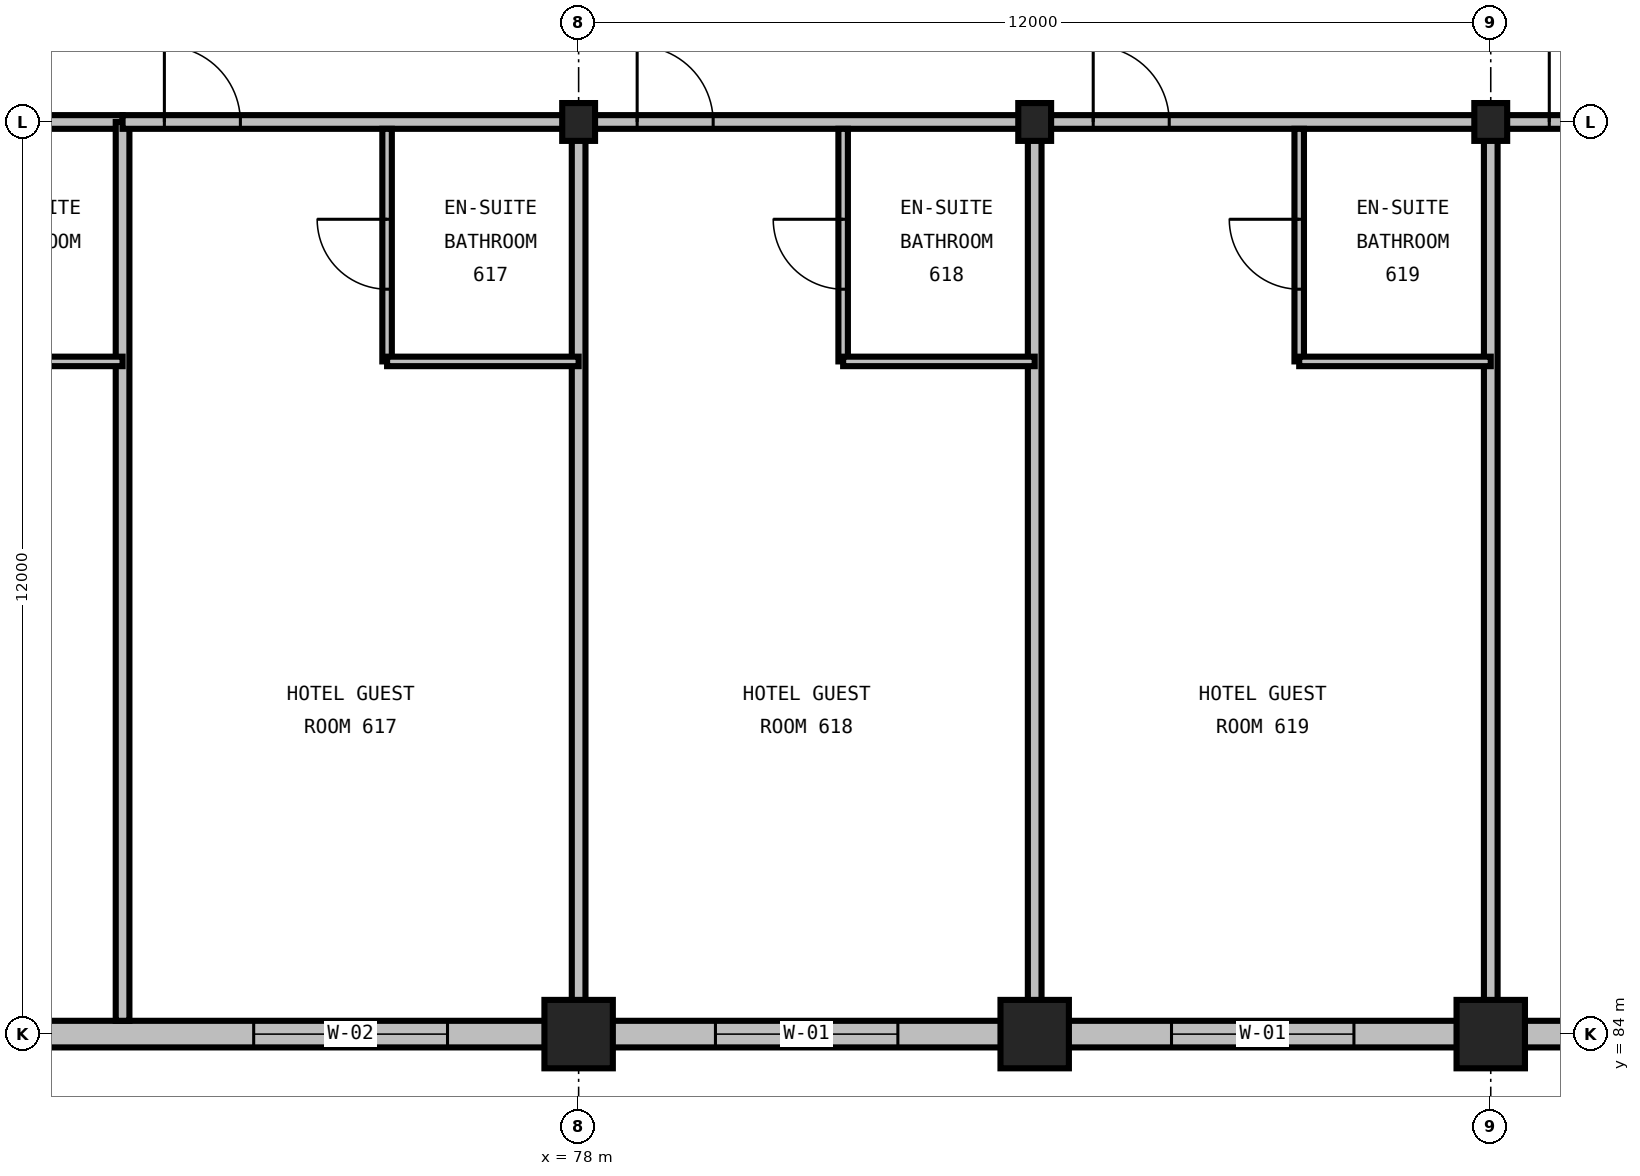
"""IFC4 building model, lengths in metres.
Left out: names, types, materials, properties, quantities, classifications, styles, units other than length and angle.
Written with IfcOpenShell. Run it as: python <this file> out.ifc"""

import sys

from ifc_helpers import new_model, si_unit, direction, frame, frame_2d, origin, origin_2d, place, context, subcontext, project, spatial, rectangle, i_section, extrude, element, fill, save


model = new_model("IFC4")
c1 = context("Model", 3, precision=1e-05, world=origin(), true_north=direction((0.0, 1.0)))
c2 = subcontext(c1, "Body", "Model", "MODEL_VIEW")
j1 = project(units=[si_unit("LENGTHUNIT", "METRE"), si_unit("PLANEANGLEUNIT", "RADIAN")], contexts=[c1])
p1 = place(None, origin())
s1 = spatial("IfcSite", under=j1, at=p1, CompositionType="ELEMENT")
p2 = place(p1, origin())
s2 = spatial("IfcBuilding", under=s1, at=p2, CompositionType="ELEMENT")
p3 = place(p2, frame((0.0, 0.0, 31.2)))
s3 = spatial("IfcBuildingStorey", under=s2, at=p3, CompositionType="ELEMENT", Elevation=31.2)
p4 = place(p3, frame((78.0, 84.0, 0.0), z_axis=(0.0, 0.0, 1.0), x_axis=(1.0, 0.0, 0.0)))
e1 = element("IfcColumn", 1, at=p4, inside=s3, PredefinedType="COLUMN", context=c2, shape_type="SweptSolid", body=[
    extrude(rectangle(XDim=0.9, YDim=0.9, at=origin_2d()), origin(), (0.0, 0.0, 1.0), 3.6),
])
p5 = place(p3, frame((78.0, 96.0, 0.0), z_axis=(0.0, 0.0, 1.0), x_axis=(1.0, 0.0, 0.0)))
e2 = element("IfcColumn", 2, at=p5, inside=s3, PredefinedType="COLUMN", context=c2, shape_type="SweptSolid", body=[
    extrude(i_section(OverallWidth=0.432, OverallDepth=0.498, WebThickness=0.056, FlangeThickness=0.089, FilletRadius=0.031, at=origin_2d()), origin(), (0.0, 0.0, 1.0), 3.6),
])
p6 = place(p3, frame((84.0, 84.0, 0.0), z_axis=(0.0, 0.0, 1.0), x_axis=(1.0, 0.0, 0.0)))
e3 = element("IfcColumn", 3, at=p6, inside=s3, PredefinedType="COLUMN", context=c2, shape_type="SweptSolid", body=[
    extrude(rectangle(XDim=0.9, YDim=0.9, at=origin_2d()), origin(), (0.0, 0.0, 1.0), 3.6),
])
p7 = place(p3, frame((84.0, 96.0, 0.0), z_axis=(0.0, 0.0, 1.0), x_axis=(1.0, 0.0, 0.0)))
e4 = element("IfcColumn", 4, at=p7, inside=s3, PredefinedType="COLUMN", context=c2, shape_type="SweptSolid", body=[
    extrude(i_section(OverallWidth=0.432, OverallDepth=0.498, WebThickness=0.056, FlangeThickness=0.089, FilletRadius=0.031, at=origin_2d()), origin(), (0.0, 0.0, 1.0), 3.6),
])
p8 = place(p3, frame((90.0, 84.0, 0.0), z_axis=(0.0, 0.0, 1.0), x_axis=(1.0, 0.0, 0.0)))
e5 = element("IfcColumn", 5, at=p8, inside=s3, PredefinedType="COLUMN", context=c2, shape_type="SweptSolid", body=[
    extrude(rectangle(XDim=0.9, YDim=0.9, at=origin_2d()), origin(), (0.0, 0.0, 1.0), 3.6),
])
p9 = place(p3, frame((90.0, 96.0, 0.0), z_axis=(0.0, 0.0, 1.0), x_axis=(1.0, 0.0, 0.0)))
e6 = element("IfcColumn", 6, at=p9, inside=s3, PredefinedType="COLUMN", context=c2, shape_type="SweptSolid", body=[
    extrude(i_section(OverallWidth=0.432, OverallDepth=0.498, WebThickness=0.056, FlangeThickness=0.089, FilletRadius=0.031, at=origin_2d()), origin(), (0.0, 0.0, 1.0), 3.6),
])
p10 = place(p3, frame((66.0, 84.0, 0.0), z_axis=(0.0, 0.0, 1.0), x_axis=(1.0, 0.0, 0.0)))
e7 = element("IfcWall", 7, at=p10, inside=s3, PredefinedType="STANDARD", context=c2, shape_type="SweptSolid", body=[
    extrude(rectangle(XDim=12.0, YDim=0.35, at=frame_2d((6.0, 0.0))), origin(), (0.0, 0.0, 1.0), 2.486),
])
p11 = place(p10, frame((1.8, 0.0, 0.75)))
e8 = element("IfcOpeningElement", 8, at=p11, cuts=e7, PredefinedType="OPENING", context=c2, shape_type="SweptSolid", body=[
    extrude(rectangle(XDim=2.4, YDim=1.65, at=frame_2d((1.2, 0.825))), frame((0.0, 0.19, 0.0), z_axis=(0.0, -1.0, 0.0), x_axis=(1.0, 0.0, 0.0)), (0.0, 0.0, 1.0), 0.38),
])
p12 = place(p10, frame((7.725, 0.0, 0.75)))
e9 = element("IfcOpeningElement", 9, at=p12, cuts=e7, PredefinedType="OPENING", context=c2, shape_type="SweptSolid", body=[
    extrude(rectangle(XDim=2.55, YDim=1.65, at=frame_2d((1.275, 0.825))), frame((0.0, 0.19, 0.0), z_axis=(0.0, -1.0, 0.0), x_axis=(1.0, 0.0, 0.0)), (0.0, 0.0, 1.0), 0.38),
])
p13 = place(p3, frame((78.0, 84.0, 0.0), z_axis=(0.0, 0.0, 1.0), x_axis=(1.0, 0.0, 0.0)))
e10 = element("IfcWall", 10, at=p13, inside=s3, PredefinedType="STANDARD", context=c2, shape_type="SweptSolid", body=[
    extrude(rectangle(XDim=6.0, YDim=0.35, at=frame_2d((3.0, 0.0))), origin(), (0.0, 0.0, 1.0), 2.486),
])
p14 = place(p13, frame((1.8, 0.0, 0.75)))
e11 = element("IfcOpeningElement", 11, at=p14, cuts=e10, PredefinedType="OPENING", context=c2, shape_type="SweptSolid", body=[
    extrude(rectangle(XDim=2.4, YDim=1.65, at=frame_2d((1.2, 0.825))), frame((0.0, 0.19, 0.0), z_axis=(0.0, -1.0, 0.0), x_axis=(1.0, 0.0, 0.0)), (0.0, 0.0, 1.0), 0.38),
])
p15 = place(p3, frame((84.0, 84.0, 0.0), z_axis=(0.0, 0.0, 1.0), x_axis=(1.0, 0.0, 0.0)))
e12 = element("IfcWall", 12, at=p15, inside=s3, PredefinedType="STANDARD", context=c2, shape_type="SweptSolid", body=[
    extrude(rectangle(XDim=6.0, YDim=0.35, at=frame_2d((3.0, 0.0))), origin(), (0.0, 0.0, 1.0), 2.486),
])
p16 = place(p15, frame((1.8, 0.0, 0.75)))
e13 = element("IfcOpeningElement", 13, at=p16, cuts=e12, PredefinedType="OPENING", context=c2, shape_type="SweptSolid", body=[
    extrude(rectangle(XDim=2.4, YDim=1.65, at=frame_2d((1.2, 0.825))), frame((0.0, 0.19, 0.0), z_axis=(0.0, -1.0, 0.0), x_axis=(1.0, 0.0, 0.0)), (0.0, 0.0, 1.0), 0.38),
])
p17 = place(p3, frame((90.0, 84.0, 0.0), z_axis=(0.0, 0.0, 1.0), x_axis=(1.0, 0.0, 0.0)))
e14 = element("IfcWall", 14, at=p17, inside=s3, PredefinedType="STANDARD", context=c2, shape_type="SweptSolid", body=[
    extrude(rectangle(XDim=6.0, YDim=0.35, at=frame_2d((3.0, 0.0))), origin(), (0.0, 0.0, 1.0), 2.486),
])
p18 = place(p17, frame((1.8, 0.0, 0.75)))
e15 = element("IfcOpeningElement", 15, at=p18, cuts=e14, PredefinedType="OPENING", context=c2, shape_type="SweptSolid", body=[
    extrude(rectangle(XDim=2.4, YDim=1.65, at=frame_2d((1.2, 0.825))), frame((0.0, 0.19, 0.0), z_axis=(0.0, -1.0, 0.0), x_axis=(1.0, 0.0, 0.0)), (0.0, 0.0, 1.0), 0.38),
])
p19 = place(p3, frame((66.0, 96.0, 0.0), z_axis=(0.0, 0.0, 1.0), x_axis=(1.0, 0.0, 0.0)))
e16 = element("IfcWall", 16, at=p19, inside=s3, PredefinedType="PARTITIONING", context=c2, shape_type="SweptSolid", body=[
    extrude(rectangle(XDim=6.0, YDim=0.18, at=frame_2d((3.0, 0.0))), origin(), (0.0, 0.0, 1.0), 2.664),
])
p20 = place(p19, frame((0.77, 0.0, 0.0)))
e17 = element("IfcOpeningElement", 17, at=p20, cuts=e16, PredefinedType="OPENING", context=c2, shape_type="SweptSolid", body=[
    extrude(rectangle(XDim=1.0, YDim=2.15, at=frame_2d((0.5, 1.075))), frame((0.0, 0.105, 0.0), z_axis=(0.0, -1.0, 0.0), x_axis=(1.0, 0.0, 0.0)), (0.0, 0.0, 1.0), 0.21),
])
p21 = place(p3, frame((72.0, 84.175, 0.0), z_axis=(0.0, 0.0, 1.0), x_axis=(0.0, 1.0, 0.0)))
e18 = element("IfcWall", 18, at=p21, inside=s3, PredefinedType="PARTITIONING", context=c2, shape_type="SweptSolid", body=[
    extrude(rectangle(XDim=11.825, YDim=0.18, at=frame_2d((5.913, 0.0))), origin(), (0.0, 0.0, 1.0), 3.29),
])
p22 = place(p3, frame((69.48, 92.85, 0.0), z_axis=(0.0, 0.0, 1.0), x_axis=(1.0, 0.0, 0.0)))
e19 = element("IfcWall", 19, at=p22, inside=s3, PredefinedType="PARTITIONING", context=c2, shape_type="SweptSolid", body=[
    extrude(rectangle(XDim=2.52, YDim=0.125, at=frame_2d((1.26, 0.0))), origin(), (0.0, 0.0, 1.0), 3.29),
])
p23 = place(p3, frame((72.0, 96.0, 0.0), z_axis=(0.0, 0.0, 1.0), x_axis=(1.0, 0.0, 0.0)))
e20 = element("IfcWall", 20, at=p23, inside=s3, PredefinedType="PARTITIONING", context=c2, shape_type="SweptSolid", body=[
    extrude(rectangle(XDim=6.0, YDim=0.18, at=frame_2d((3.0, 0.0))), origin(), (0.0, 0.0, 1.0), 2.664),
])
p24 = place(p23, frame((0.55, 0.0, 0.0)))
e21 = element("IfcOpeningElement", 21, at=p24, cuts=e20, PredefinedType="OPENING", context=c2, shape_type="SweptSolid", body=[
    extrude(rectangle(XDim=1.0, YDim=2.15, at=frame_2d((0.5, 1.075))), frame((0.0, 0.105, 0.0), z_axis=(0.0, -1.0, 0.0), x_axis=(1.0, 0.0, 0.0)), (0.0, 0.0, 1.0), 0.21),
])
p25 = place(p3, frame((78.0, 84.175, 0.0), z_axis=(0.0, 0.0, 1.0), x_axis=(0.0, 1.0, 0.0)))
e22 = element("IfcWall", 22, at=p25, inside=s3, PredefinedType="PARTITIONING", context=c2, shape_type="SweptSolid", body=[
    extrude(rectangle(XDim=11.825, YDim=0.18, at=frame_2d((5.913, 0.0))), origin(), (0.0, 0.0, 1.0), 2.59),
])
p26 = place(p3, frame((75.48, 92.85, 0.0), z_axis=(0.0, 0.0, 1.0), x_axis=(0.0, 1.0, 0.0)))
e23 = element("IfcWall", 23, at=p26, inside=s3, PredefinedType="PARTITIONING", context=c2, shape_type="SweptSolid", body=[
    extrude(rectangle(XDim=3.06, YDim=0.125, at=frame_2d((1.53, 0.0))), origin(), (0.0, 0.0, 1.0), 3.29),
])
p27 = place(p26, frame((0.95, 0.0, 0.0)))
e24 = element("IfcOpeningElement", 24, at=p27, cuts=e23, PredefinedType="OPENING", context=c2, shape_type="SweptSolid", body=[
    extrude(rectangle(XDim=0.92, YDim=2.1, at=frame_2d((0.46, 1.05))), frame((0.0, 0.077, 0.0), z_axis=(0.0, -1.0, 0.0), x_axis=(1.0, 0.0, 0.0)), (0.0, 0.0, 1.0), 0.155),
])
p28 = place(p3, frame((75.48, 92.85, 0.0), z_axis=(0.0, 0.0, 1.0), x_axis=(1.0, 0.0, 0.0)))
e25 = element("IfcWall", 25, at=p28, inside=s3, PredefinedType="PARTITIONING", context=c2, shape_type="SweptSolid", body=[
    extrude(rectangle(XDim=2.52, YDim=0.125, at=frame_2d((1.26, 0.0))), origin(), (0.0, 0.0, 1.0), 3.29),
])
p29 = place(p3, frame((78.0, 96.0, 0.0), z_axis=(0.0, 0.0, 1.0), x_axis=(1.0, 0.0, 0.0)))
e26 = element("IfcWall", 26, at=p29, inside=s3, PredefinedType="PARTITIONING", context=c2, shape_type="SweptSolid", body=[
    extrude(rectangle(XDim=6.0, YDim=0.18, at=frame_2d((3.0, 0.0))), origin(), (0.0, 0.0, 1.0), 2.736),
])
p30 = place(p29, frame((0.77, 0.0, 0.0)))
e27 = element("IfcOpeningElement", 27, at=p30, cuts=e26, PredefinedType="OPENING", context=c2, shape_type="SweptSolid", body=[
    extrude(rectangle(XDim=1.0, YDim=2.15, at=frame_2d((0.5, 1.075))), frame((0.0, 0.105, 0.0), z_axis=(0.0, -1.0, 0.0), x_axis=(1.0, 0.0, 0.0)), (0.0, 0.0, 1.0), 0.21),
])
p31 = place(p3, frame((84.0, 84.175, 0.0), z_axis=(0.0, 0.0, 1.0), x_axis=(0.0, 1.0, 0.0)))
e28 = element("IfcWall", 28, at=p31, inside=s3, PredefinedType="PARTITIONING", context=c2, shape_type="SweptSolid", body=[
    extrude(rectangle(XDim=11.825, YDim=0.18, at=frame_2d((5.913, 0.0))), origin(), (0.0, 0.0, 1.0), 2.59),
])
p32 = place(p3, frame((81.48, 92.85, 0.0), z_axis=(0.0, 0.0, 1.0), x_axis=(0.0, 1.0, 0.0)))
e29 = element("IfcWall", 29, at=p32, inside=s3, PredefinedType="PARTITIONING", context=c2, shape_type="SweptSolid", body=[
    extrude(rectangle(XDim=3.06, YDim=0.125, at=frame_2d((1.53, 0.0))), origin(), (0.0, 0.0, 1.0), 3.29),
])
p33 = place(p32, frame((0.95, 0.0, 0.0)))
e30 = element("IfcOpeningElement", 30, at=p33, cuts=e29, PredefinedType="OPENING", context=c2, shape_type="SweptSolid", body=[
    extrude(rectangle(XDim=0.92, YDim=2.1, at=frame_2d((0.46, 1.05))), frame((0.0, 0.077, 0.0), z_axis=(0.0, -1.0, 0.0), x_axis=(1.0, 0.0, 0.0)), (0.0, 0.0, 1.0), 0.155),
])
p34 = place(p3, frame((81.48, 92.85, 0.0), z_axis=(0.0, 0.0, 1.0), x_axis=(1.0, 0.0, 0.0)))
e31 = element("IfcWall", 31, at=p34, inside=s3, PredefinedType="PARTITIONING", context=c2, shape_type="SweptSolid", body=[
    extrude(rectangle(XDim=2.52, YDim=0.125, at=frame_2d((1.26, 0.0))), origin(), (0.0, 0.0, 1.0), 3.29),
])
p35 = place(p3, frame((84.0, 96.0, 0.0), z_axis=(0.0, 0.0, 1.0), x_axis=(1.0, 0.0, 0.0)))
e32 = element("IfcWall", 32, at=p35, inside=s3, PredefinedType="PARTITIONING", context=c2, shape_type="SweptSolid", body=[
    extrude(rectangle(XDim=6.0, YDim=0.18, at=frame_2d((3.0, 0.0))), origin(), (0.0, 0.0, 1.0), 2.736),
])
p36 = place(p35, frame((0.77, 0.0, 0.0)))
e33 = element("IfcOpeningElement", 33, at=p36, cuts=e32, PredefinedType="OPENING", context=c2, shape_type="SweptSolid", body=[
    extrude(rectangle(XDim=1.0, YDim=2.15, at=frame_2d((0.5, 1.075))), frame((0.0, 0.105, 0.0), z_axis=(0.0, -1.0, 0.0), x_axis=(1.0, 0.0, 0.0)), (0.0, 0.0, 1.0), 0.21),
])
p37 = place(p3, frame((90.0, 84.175, 0.0), z_axis=(0.0, 0.0, 1.0), x_axis=(0.0, 1.0, 0.0)))
e34 = element("IfcWall", 34, at=p37, inside=s3, PredefinedType="PARTITIONING", context=c2, shape_type="SweptSolid", body=[
    extrude(rectangle(XDim=11.825, YDim=0.18, at=frame_2d((5.913, 0.0))), origin(), (0.0, 0.0, 1.0), 2.59),
])
p38 = place(p3, frame((87.48, 92.85, 0.0), z_axis=(0.0, 0.0, 1.0), x_axis=(0.0, 1.0, 0.0)))
e35 = element("IfcWall", 35, at=p38, inside=s3, PredefinedType="PARTITIONING", context=c2, shape_type="SweptSolid", body=[
    extrude(rectangle(XDim=3.06, YDim=0.125, at=frame_2d((1.53, 0.0))), origin(), (0.0, 0.0, 1.0), 3.29),
])
p39 = place(p38, frame((0.95, 0.0, 0.0)))
e36 = element("IfcOpeningElement", 36, at=p39, cuts=e35, PredefinedType="OPENING", context=c2, shape_type="SweptSolid", body=[
    extrude(rectangle(XDim=0.92, YDim=2.1, at=frame_2d((0.46, 1.05))), frame((0.0, 0.077, 0.0), z_axis=(0.0, -1.0, 0.0), x_axis=(1.0, 0.0, 0.0)), (0.0, 0.0, 1.0), 0.155),
])
p40 = place(p3, frame((87.48, 92.85, 0.0), z_axis=(0.0, 0.0, 1.0), x_axis=(1.0, 0.0, 0.0)))
e37 = element("IfcWall", 37, at=p40, inside=s3, PredefinedType="PARTITIONING", context=c2, shape_type="SweptSolid", body=[
    extrude(rectangle(XDim=2.52, YDim=0.125, at=frame_2d((1.26, 0.0))), origin(), (0.0, 0.0, 1.0), 3.29),
])
p41 = place(p3, frame((90.0, 96.0, 0.0), z_axis=(0.0, 0.0, 1.0), x_axis=(1.0, 0.0, 0.0)))
e38 = element("IfcWall", 38, at=p41, inside=s3, PredefinedType="PARTITIONING", context=c2, shape_type="SweptSolid", body=[
    extrude(rectangle(XDim=5.915, YDim=0.18, at=frame_2d((2.957, 0.0))), origin(), (0.0, 0.0, 1.0), 2.736),
])
p42 = place(p41, frame((0.77, 0.0, 0.0)))
e39 = element("IfcOpeningElement", 39, at=p42, cuts=e38, PredefinedType="OPENING", context=c2, shape_type="SweptSolid", body=[
    extrude(rectangle(XDim=1.0, YDim=2.15, at=frame_2d((0.5, 1.075))), frame((0.0, 0.105, 0.0), z_axis=(0.0, -1.0, 0.0), x_axis=(1.0, 0.0, 0.0)), (0.0, 0.0, 1.0), 0.21),
])
p43 = place(p12, origin())
e40 = element("IfcWindow", 40, at=p43, inside=s3, PartitioningType="DOUBLE_PANEL_VERTICAL", PredefinedType="WINDOW", context=c2, shape_type="SweptSolid", body=[
    extrude(rectangle(XDim=2.55, YDim=1.65, at=frame_2d((1.275, 0.825))), frame((0.0, 0.03, 0.0), z_axis=(0.0, -1.0, 0.0), x_axis=(1.0, 0.0, 0.0)), (0.0, 0.0, 1.0), 0.06),
])
fill(e9, e40)
p44 = place(p14, origin())
e41 = element("IfcWindow", 41, at=p44, inside=s3, PartitioningType="DOUBLE_PANEL_VERTICAL", PredefinedType="WINDOW", context=c2, shape_type="SweptSolid", body=[
    extrude(rectangle(XDim=2.4, YDim=1.65, at=frame_2d((1.2, 0.825))), frame((0.0, 0.03, 0.0), z_axis=(0.0, -1.0, 0.0), x_axis=(1.0, 0.0, 0.0)), (0.0, 0.0, 1.0), 0.06),
])
fill(e11, e41)
p45 = place(p16, origin())
e42 = element("IfcWindow", 42, at=p45, inside=s3, PartitioningType="DOUBLE_PANEL_VERTICAL", PredefinedType="WINDOW", context=c2, shape_type="SweptSolid", body=[
    extrude(rectangle(XDim=2.4, YDim=1.65, at=frame_2d((1.2, 0.825))), frame((0.0, 0.03, 0.0), z_axis=(0.0, -1.0, 0.0), x_axis=(1.0, 0.0, 0.0)), (0.0, 0.0, 1.0), 0.06),
])
fill(e13, e42)
p46 = place(p24, origin())
e43 = element("IfcDoor", 43, at=p46, inside=s3, OperationType="SINGLE_SWING_LEFT", PredefinedType="DOOR", context=c2, shape_type="SweptSolid", body=[
    extrude(rectangle(XDim=1.0, YDim=2.15, at=frame_2d((0.5, 1.075))), frame((0.0, 0.025, 0.0), z_axis=(0.0, -1.0, 0.0), x_axis=(1.0, 0.0, 0.0)), (0.0, 0.0, 1.0), 0.05),
])
fill(e21, e43)
p47 = place(p27, origin())
e44 = element("IfcDoor", 44, at=p47, inside=s3, OperationType="SINGLE_SWING_RIGHT", PredefinedType="DOOR", context=c2, shape_type="SweptSolid", body=[
    extrude(rectangle(XDim=0.92, YDim=2.1, at=frame_2d((0.46, 1.05))), frame((0.0, 0.025, 0.0), z_axis=(0.0, -1.0, 0.0), x_axis=(1.0, 0.0, 0.0)), (0.0, 0.0, 1.0), 0.05),
])
fill(e24, e44)
p48 = place(p30, origin())
e45 = element("IfcDoor", 45, at=p48, inside=s3, OperationType="SINGLE_SWING_LEFT", PredefinedType="DOOR", context=c2, shape_type="SweptSolid", body=[
    extrude(rectangle(XDim=1.0, YDim=2.15, at=frame_2d((0.5, 1.075))), frame((0.0, 0.025, 0.0), z_axis=(0.0, -1.0, 0.0), x_axis=(1.0, 0.0, 0.0)), (0.0, 0.0, 1.0), 0.05),
])
fill(e27, e45)
p49 = place(p33, origin())
e46 = element("IfcDoor", 46, at=p49, inside=s3, OperationType="SINGLE_SWING_RIGHT", PredefinedType="DOOR", context=c2, shape_type="SweptSolid", body=[
    extrude(rectangle(XDim=0.92, YDim=2.1, at=frame_2d((0.46, 1.05))), frame((0.0, 0.025, 0.0), z_axis=(0.0, -1.0, 0.0), x_axis=(1.0, 0.0, 0.0)), (0.0, 0.0, 1.0), 0.05),
])
fill(e30, e46)
p50 = place(p36, origin())
e47 = element("IfcDoor", 47, at=p50, inside=s3, OperationType="SINGLE_SWING_LEFT", PredefinedType="DOOR", context=c2, shape_type="SweptSolid", body=[
    extrude(rectangle(XDim=1.0, YDim=2.15, at=frame_2d((0.5, 1.075))), frame((0.0, 0.025, 0.0), z_axis=(0.0, -1.0, 0.0), x_axis=(1.0, 0.0, 0.0)), (0.0, 0.0, 1.0), 0.05),
])
fill(e33, e47)
p51 = place(p39, origin())
e48 = element("IfcDoor", 48, at=p51, inside=s3, OperationType="SINGLE_SWING_RIGHT", PredefinedType="DOOR", context=c2, shape_type="SweptSolid", body=[
    extrude(rectangle(XDim=0.92, YDim=2.1, at=frame_2d((0.46, 1.05))), frame((0.0, 0.025, 0.0), z_axis=(0.0, -1.0, 0.0), x_axis=(1.0, 0.0, 0.0)), (0.0, 0.0, 1.0), 0.05),
])
fill(e36, e48)
p52 = place(p42, origin())
e49 = element("IfcDoor", 49, at=p52, inside=s3, OperationType="SINGLE_SWING_LEFT", PredefinedType="DOOR", context=c2, shape_type="SweptSolid", body=[
    extrude(rectangle(XDim=1.0, YDim=2.15, at=frame_2d((0.5, 1.075))), frame((0.0, 0.025, 0.0), z_axis=(0.0, -1.0, 0.0), x_axis=(1.0, 0.0, 0.0)), (0.0, 0.0, 1.0), 0.05),
])
fill(e39, e49)
save(model, sys.argv[1])
